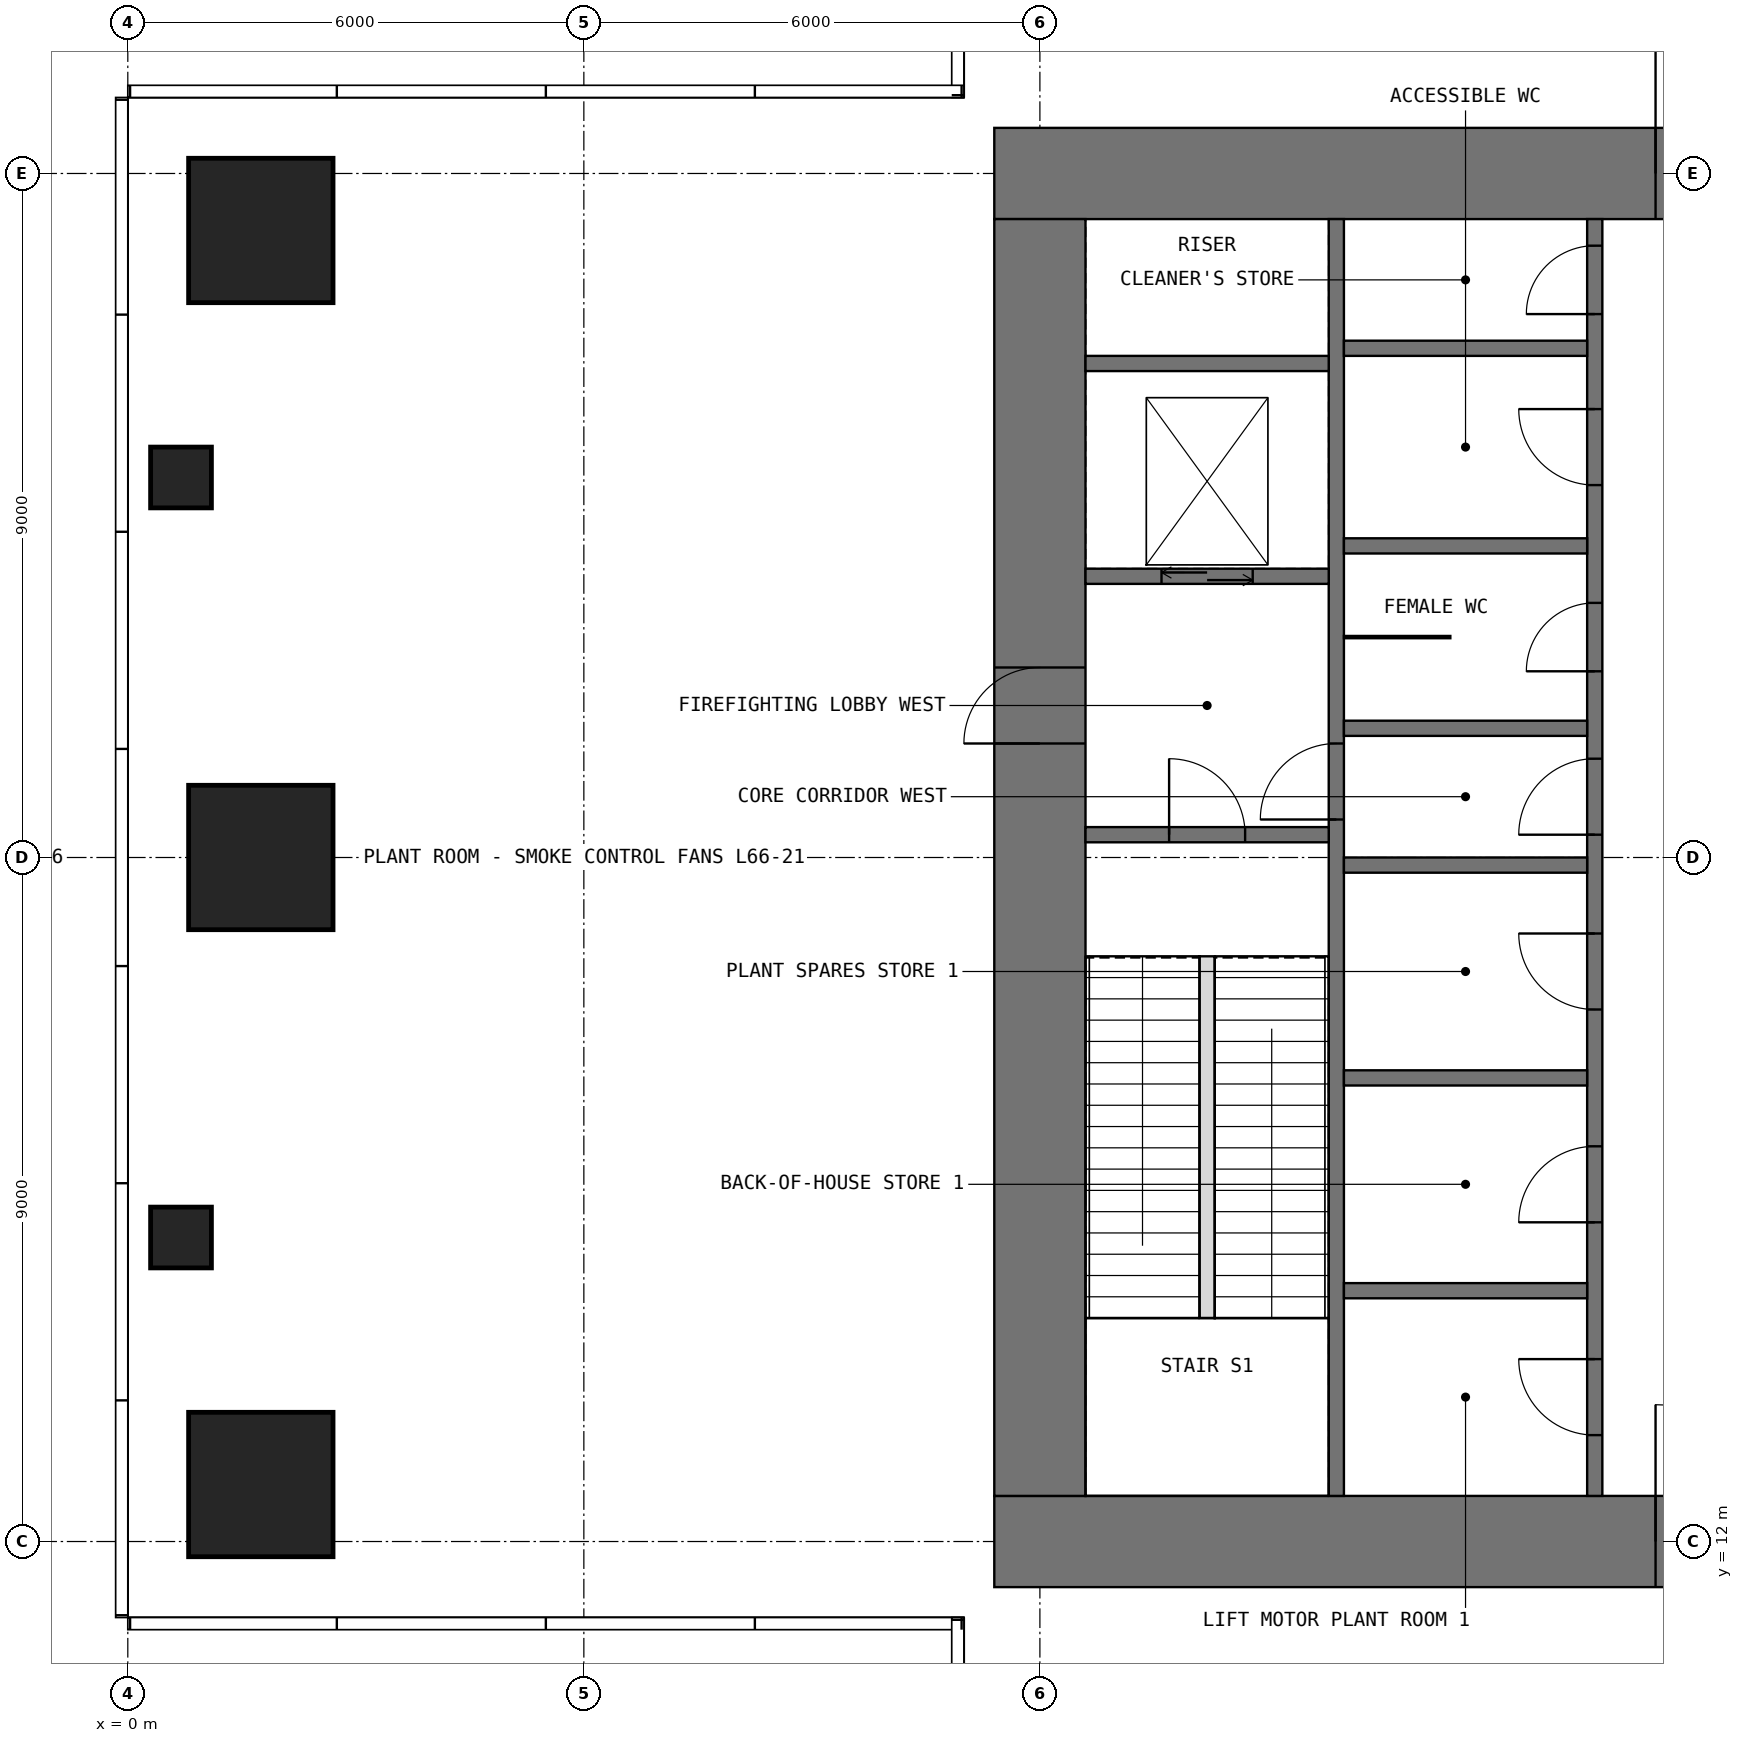
"""IFC4 building model, lengths in metres.
Left out: names, types, materials, properties, quantities, classifications, styles, units other than length and angle.
Written with IfcOpenShell. Run it as: python <this file> out.ifc"""

import sys

from ifc_helpers import new_model, si_unit, direction, frame, frame_2d, origin, origin_2d, place, context, subcontext, project, spatial, rectangle, extrude, element, fill, save


model = new_model("IFC4")
c1 = context("Model", 3, precision=1e-05, world=origin(), true_north=direction((0.0, 1.0)))
c2 = subcontext(c1, "Body", "Model", "MODEL_VIEW")
j1 = project(units=[si_unit("LENGTHUNIT", "METRE"), si_unit("PLANEANGLEUNIT", "RADIAN")], contexts=[c1])
p1 = place(None, origin())
s1 = spatial("IfcSite", under=j1, at=p1, CompositionType="ELEMENT")
p2 = place(p1, origin())
s2 = spatial("IfcBuilding", under=s1, at=p2, CompositionType="ELEMENT")
p3 = place(p2, frame((0.0, 0.0, 277.9)))
s3 = spatial("IfcBuildingStorey", under=s2, at=p3, CompositionType="ELEMENT", Elevation=277.9)
p4 = place(p3, frame((1.75, 12.75, 0.0), z_axis=(0.0, 0.0, 1.0), x_axis=(1.0, 0.0, 0.0)))
e1 = element("IfcColumn", 1, at=p4, inside=s3, PredefinedType="COLUMN", context=c2, shape_type="SweptSolid", body=[
    extrude(rectangle(XDim=1.9, YDim=1.9, at=origin_2d()), origin(), (0.0, 0.0, 1.0), 6.0),
])
p5 = place(p3, frame((0.7, 16.0, 0.0), z_axis=(0.0, 0.0, 1.0), x_axis=(1.0, 0.0, 0.0)))
e2 = element("IfcColumn", 2, at=p5, inside=s3, PredefinedType="COLUMN", context=c2, shape_type="SweptSolid", body=[
    extrude(rectangle(XDim=0.8, YDim=0.8, at=origin_2d()), origin(), (0.0, 0.0, 1.0), 6.0),
])
p6 = place(p3, frame((1.75, 21.0, 0.0), z_axis=(0.0, 0.0, 1.0), x_axis=(1.0, 0.0, 0.0)))
e3 = element("IfcColumn", 3, at=p6, inside=s3, PredefinedType="COLUMN", context=c2, shape_type="SweptSolid", body=[
    extrude(rectangle(XDim=1.9, YDim=1.9, at=origin_2d()), origin(), (0.0, 0.0, 1.0), 6.0),
])
p7 = place(p3, frame((0.7, 26.0, 0.0), z_axis=(0.0, 0.0, 1.0), x_axis=(1.0, 0.0, 0.0)))
e4 = element("IfcColumn", 4, at=p7, inside=s3, PredefinedType="COLUMN", context=c2, shape_type="SweptSolid", body=[
    extrude(rectangle(XDim=0.8, YDim=0.8, at=origin_2d()), origin(), (0.0, 0.0, 1.0), 6.0),
])
p8 = place(p3, frame((1.75, 29.25, 0.0), z_axis=(0.0, 0.0, 1.0), x_axis=(1.0, 0.0, 0.0)))
e5 = element("IfcColumn", 5, at=p8, inside=s3, PredefinedType="COLUMN", context=c2, shape_type="SweptSolid", body=[
    extrude(rectangle(XDim=1.9, YDim=1.9, at=origin_2d()), origin(), (0.0, 0.0, 1.0), 6.0),
])
p9 = place(p3, frame((11.4, 12.0, -0.1), z_axis=(0.0, 0.0, 1.0), x_axis=(1.0, 0.0, 0.0)))
e6 = element("IfcWall", 6, at=p9, inside=s3, PredefinedType="SHEAR", context=c2, shape_type="SweptSolid", body=[
    extrude(rectangle(XDim=19.2, YDim=1.2, at=frame_2d((9.6, 0.0))), origin(), (0.0, 0.0, 1.0), 6.0),
])
p10 = place(p9, frame((8.7, 0.0, 0.1)))
e7 = element("IfcOpeningElement", 7, at=p10, cuts=e6, PredefinedType="OPENING", context=c2, shape_type="SweptSolid", body=[
    extrude(rectangle(XDim=1.8, YDim=2.4, at=frame_2d((0.9, 1.2))), frame((0.0, 0.61, 0.0), z_axis=(0.0, -1.0, 0.0), x_axis=(1.0, 0.0, 0.0)), (0.0, 0.0, 1.0), 1.22),
])
p11 = place(p3, frame((11.4, 30.0, -0.1), z_axis=(0.0, 0.0, 1.0), x_axis=(1.0, 0.0, 0.0)))
e8 = element("IfcWall", 8, at=p11, inside=s3, PredefinedType="SHEAR", context=c2, shape_type="SweptSolid", body=[
    extrude(rectangle(XDim=19.2, YDim=1.2, at=frame_2d((9.6, 0.0))), origin(), (0.0, 0.0, 1.0), 6.0),
])
p12 = place(p11, frame((8.7, 0.0, 0.1)))
e9 = element("IfcOpeningElement", 9, at=p12, cuts=e8, PredefinedType="OPENING", context=c2, shape_type="SweptSolid", body=[
    extrude(rectangle(XDim=1.8, YDim=2.4, at=frame_2d((0.9, 1.2))), frame((0.0, 0.61, 0.0), z_axis=(0.0, -1.0, 0.0), x_axis=(1.0, 0.0, 0.0)), (0.0, 0.0, 1.0), 1.22),
])
p13 = place(p3, frame((12.0, 12.6, -0.1), z_axis=(0.0, 0.0, 1.0), x_axis=(0.0, 1.0, 0.0)))
e10 = element("IfcWall", 10, at=p13, inside=s3, PredefinedType="SHEAR", context=c2, shape_type="SweptSolid", body=[
    extrude(rectangle(XDim=16.8, YDim=1.2, at=frame_2d((8.4, 0.0))), origin(), (0.0, 0.0, 1.0), 6.0),
])
p14 = place(p13, frame((9.9, 0.0, 0.1)))
e11 = element("IfcOpeningElement", 11, at=p14, cuts=e10, PredefinedType="OPENING", context=c2, shape_type="SweptSolid", body=[
    extrude(rectangle(XDim=1.0, YDim=2.2, at=frame_2d((0.5, 1.1))), frame((0.0, 0.61, 0.0), z_axis=(0.0, -1.0, 0.0), x_axis=(1.0, 0.0, 0.0)), (0.0, 0.0, 1.0), 1.22),
])
p15 = place(p3, frame((15.9, 12.6, -0.1), z_axis=(0.0, 0.0, 1.0), x_axis=(0.0, 1.0, 0.0)))
e12 = element("IfcWall", 12, at=p15, inside=s3, PredefinedType="SHEAR", context=c2, shape_type="SweptSolid", body=[
    extrude(rectangle(XDim=16.8, YDim=0.2, at=frame_2d((8.4, 0.0))), origin(), (0.0, 0.0, 1.0), 6.0),
])
p16 = place(p15, frame((8.9, 0.0, 0.1)))
e13 = element("IfcOpeningElement", 13, at=p16, cuts=e12, PredefinedType="OPENING", context=c2, shape_type="SweptSolid", body=[
    extrude(rectangle(XDim=1.0, YDim=2.2, at=frame_2d((0.5, 1.1))), frame((0.0, 0.11, 0.0), z_axis=(0.0, -1.0, 0.0), x_axis=(1.0, 0.0, 0.0)), (0.0, 0.0, 1.0), 0.22),
])
p17 = place(p3, frame((19.3, 12.6, -0.1), z_axis=(0.0, 0.0, 1.0), x_axis=(0.0, 1.0, 0.0)))
e14 = element("IfcWall", 14, at=p17, inside=s3, PredefinedType="SHEAR", context=c2, shape_type="SweptSolid", body=[
    extrude(rectangle(XDim=16.8, YDim=0.2, at=frame_2d((8.4, 0.0))), origin(), (0.0, 0.0, 1.0), 6.0),
])
p18 = place(p17, frame((8.7, 0.0, 0.1)))
e15 = element("IfcOpeningElement", 15, at=p18, cuts=e14, PredefinedType="OPENING", context=c2, shape_type="SweptSolid", body=[
    extrude(rectangle(XDim=1.0, YDim=2.2, at=frame_2d((0.5, 1.1))), frame((0.0, 0.11, 0.0), z_axis=(0.0, -1.0, 0.0), x_axis=(1.0, 0.0, 0.0)), (0.0, 0.0, 1.0), 0.22),
])
p19 = place(p17, frame((10.85, 0.0, 0.1)))
e16 = element("IfcOpeningElement", 16, at=p19, cuts=e14, PredefinedType="OPENING", context=c2, shape_type="SweptSolid", body=[
    extrude(rectangle(XDim=0.9, YDim=2.2, at=frame_2d((0.45, 1.1))), frame((0.0, 0.11, 0.0), z_axis=(0.0, -1.0, 0.0), x_axis=(1.0, 0.0, 0.0)), (0.0, 0.0, 1.0), 0.22),
])
p20 = place(p17, frame((13.3, 0.0, 0.1)))
e17 = element("IfcOpeningElement", 17, at=p20, cuts=e14, PredefinedType="OPENING", context=c2, shape_type="SweptSolid", body=[
    extrude(rectangle(XDim=1.0, YDim=2.2, at=frame_2d((0.5, 1.1))), frame((0.0, 0.11, 0.0), z_axis=(0.0, -1.0, 0.0), x_axis=(1.0, 0.0, 0.0)), (0.0, 0.0, 1.0), 0.22),
])
p21 = place(p17, frame((15.55, 0.0, 0.1)))
e18 = element("IfcOpeningElement", 18, at=p21, cuts=e14, PredefinedType="OPENING", context=c2, shape_type="SweptSolid", body=[
    extrude(rectangle(XDim=0.9, YDim=2.2, at=frame_2d((0.45, 1.1))), frame((0.0, 0.11, 0.0), z_axis=(0.0, -1.0, 0.0), x_axis=(1.0, 0.0, 0.0)), (0.0, 0.0, 1.0), 0.22),
])
p22 = place(p17, frame((0.8, 0.0, 0.1)))
e19 = element("IfcOpeningElement", 19, at=p22, cuts=e14, PredefinedType="OPENING", context=c2, shape_type="SweptSolid", body=[
    extrude(rectangle(XDim=1.0, YDim=2.2, at=frame_2d((0.5, 1.1))), frame((0.0, 0.11, 0.0), z_axis=(0.0, -1.0, 0.0), x_axis=(1.0, 0.0, 0.0)), (0.0, 0.0, 1.0), 0.22),
])
p23 = place(p17, frame((3.6, 0.0, 0.1)))
e20 = element("IfcOpeningElement", 20, at=p23, cuts=e14, PredefinedType="OPENING", context=c2, shape_type="SweptSolid", body=[
    extrude(rectangle(XDim=1.0, YDim=2.2, at=frame_2d((0.5, 1.1))), frame((0.0, 0.11, 0.0), z_axis=(0.0, -1.0, 0.0), x_axis=(1.0, 0.0, 0.0)), (0.0, 0.0, 1.0), 0.22),
])
p24 = place(p17, frame((6.4, 0.0, 0.1)))
e21 = element("IfcOpeningElement", 21, at=p24, cuts=e14, PredefinedType="OPENING", context=c2, shape_type="SweptSolid", body=[
    extrude(rectangle(XDim=1.0, YDim=2.2, at=frame_2d((0.5, 1.1))), frame((0.0, 0.11, 0.0), z_axis=(0.0, -1.0, 0.0), x_axis=(1.0, 0.0, 0.0)), (0.0, 0.0, 1.0), 0.22),
])
p25 = place(p3, frame((12.6, 21.3, -0.1), z_axis=(0.0, 0.0, 1.0), x_axis=(1.0, 0.0, 0.0)))
e22 = element("IfcWall", 22, at=p25, inside=s3, PredefinedType="SHEAR", context=c2, shape_type="SweptSolid", body=[
    extrude(rectangle(XDim=3.2, YDim=0.2, at=frame_2d((1.6, 0.0))), origin(), (0.0, 0.0, 1.0), 6.0),
])
p26 = place(p25, frame((1.1, 0.0, 0.1)))
e23 = element("IfcOpeningElement", 23, at=p26, cuts=e22, PredefinedType="OPENING", context=c2, shape_type="SweptSolid", body=[
    extrude(rectangle(XDim=1.0, YDim=2.2, at=frame_2d((0.5, 1.1))), frame((0.0, 0.11, 0.0), z_axis=(0.0, -1.0, 0.0), x_axis=(1.0, 0.0, 0.0)), (0.0, 0.0, 1.0), 0.22),
])
p27 = place(p3, frame((12.6, 24.7, -0.1), z_axis=(0.0, 0.0, 1.0), x_axis=(1.0, 0.0, 0.0)))
e24 = element("IfcWall", 24, at=p27, inside=s3, PredefinedType="SHEAR", context=c2, shape_type="SweptSolid", body=[
    extrude(rectangle(XDim=3.2, YDim=0.2, at=frame_2d((1.6, 0.0))), origin(), (0.0, 0.0, 1.0), 6.0),
])
p28 = place(p27, frame((1.0, 0.0, 0.1)))
e25 = element("IfcOpeningElement", 25, at=p28, cuts=e24, PredefinedType="OPENING", context=c2, shape_type="SweptSolid", body=[
    extrude(rectangle(XDim=1.2, YDim=2.2, at=frame_2d((0.6, 1.1))), frame((0.0, 0.11, 0.0), z_axis=(0.0, -1.0, 0.0), x_axis=(1.0, 0.0, 0.0)), (0.0, 0.0, 1.0), 0.22),
])
for number, where, z_axis, x_axis in (
    (26, (12.6, 27.5, -0.1), (0.0, 0.0, 1.0), (1.0, 0.0, 0.0)),
    (27, (16.0, 15.3, -0.1), (0.0, 0.0, 1.0), (1.0, 0.0, 0.0)),
    (28, (16.0, 18.1, -0.1), (0.0, 0.0, 1.0), (1.0, 0.0, 0.0)),
    (29, (16.0, 20.9, -0.1), (0.0, 0.0, 1.0), (1.0, 0.0, 0.0)),
    (30, (16.0, 22.7, -0.1), (0.0, 0.0, 1.0), (1.0, 0.0, 0.0)),
    (31, (16.0, 25.1, -0.1), (0.0, 0.0, 1.0), (1.0, 0.0, 0.0)),
    (32, (16.0, 27.7, -0.1), (0.0, 0.0, 1.0), (1.0, 0.0, 0.0)),
):
    element("IfcWall", number, at=place(p3, frame(where, z_axis=z_axis, x_axis=x_axis)), inside=s3, PredefinedType="SHEAR", context=c2, shape_type="SweptSolid", body=[
        extrude(rectangle(XDim=3.2, YDim=0.2, at=frame_2d((1.6, 0.0))), origin(), (0.0, 0.0, 1.0), 6.0),
    ])
p29 = place(p3, frame((16.0, 23.9, 0.0), z_axis=(0.0, 0.0, 1.0), x_axis=(1.0, 0.0, 0.0)))
e33 = element("IfcWall", 33, at=p29, inside=s3, PredefinedType="PARTITIONING", context=c2, shape_type="SweptSolid", body=[
    extrude(rectangle(XDim=1.4, YDim=0.03, at=frame_2d((0.7, 0.0))), origin(), (0.0, 0.0, 1.0), 5.7),
])
p30 = place(p3, frame((14.2, 14.94, 0.0), z_axis=(0.0, 0.0, 1.0), x_axis=(0.0, 1.0, 0.0)))
e34 = element("IfcWall", 34, at=p30, inside=s3, PredefinedType="PARTITIONING", context=c2, shape_type="SweptSolid", body=[
    extrude(rectangle(XDim=4.76, YDim=0.2, at=frame_2d((2.38, 0.0))), origin(), (0.0, 0.0, 1.0), 6.0),
])
p31 = place(p10, origin())
e35 = element("IfcDoor", 35, at=p31, inside=s3, OperationType="DOUBLE_DOOR_SINGLE_SWING", PredefinedType="DOOR", context=c2, shape_type="SweptSolid", body=[
    extrude(rectangle(XDim=1.8, YDim=2.4, at=frame_2d((0.9, 1.2))), frame((0.0, -0.275, 0.0), z_axis=(0.0, -1.0, 0.0), x_axis=(1.0, 0.0, 0.0)), (0.0, 0.0, 1.0), 0.05),
])
fill(e7, e35)
p32 = place(p12, origin())
e36 = element("IfcDoor", 36, at=p32, inside=s3, OperationType="DOUBLE_DOOR_SINGLE_SWING", PredefinedType="DOOR", context=c2, shape_type="SweptSolid", body=[
    extrude(rectangle(XDim=1.8, YDim=2.4, at=frame_2d((0.9, 1.2))), frame((0.0, 0.325, 0.0), z_axis=(0.0, -1.0, 0.0), x_axis=(1.0, 0.0, 0.0)), (0.0, 0.0, 1.0), 0.05),
])
fill(e9, e36)
p33 = place(p14, origin())
e37 = element("IfcDoor", 37, at=p33, inside=s3, OperationType="SINGLE_SWING_LEFT", PredefinedType="DOOR", context=c2, shape_type="SweptSolid", body=[
    extrude(rectangle(XDim=1.0, YDim=2.2, at=frame_2d((0.5, 1.1))), frame((0.0, 0.325, 0.0), z_axis=(0.0, -1.0, 0.0), x_axis=(1.0, 0.0, 0.0)), (0.0, 0.0, 1.0), 0.05),
])
fill(e11, e37)
p34 = place(p26, origin())
e38 = element("IfcDoor", 38, at=p34, inside=s3, OperationType="SINGLE_SWING_LEFT", PredefinedType="DOOR", context=c2, shape_type="SweptSolid", body=[
    extrude(rectangle(XDim=1.0, YDim=2.2, at=frame_2d((0.5, 1.1))), frame((0.0, 0.025, 0.0), z_axis=(0.0, -1.0, 0.0), x_axis=(1.0, 0.0, 0.0)), (0.0, 0.0, 1.0), 0.05),
])
fill(e23, e38)
p35 = place(p16, origin())
e39 = element("IfcDoor", 39, at=p35, inside=s3, OperationType="SINGLE_SWING_LEFT", PredefinedType="DOOR", context=c2, shape_type="SweptSolid", body=[
    extrude(rectangle(XDim=1.0, YDim=2.2, at=frame_2d((0.5, 1.1))), frame((0.0, 0.025, 0.0), z_axis=(0.0, -1.0, 0.0), x_axis=(1.0, 0.0, 0.0)), (0.0, 0.0, 1.0), 0.05),
])
fill(e13, e39)
p36 = place(p18, origin())
e40 = element("IfcDoor", 40, at=p36, inside=s3, OperationType="SINGLE_SWING_LEFT", PredefinedType="DOOR", context=c2, shape_type="SweptSolid", body=[
    extrude(rectangle(XDim=1.0, YDim=2.2, at=frame_2d((0.5, 1.1))), frame((0.0, 0.025, 0.0), z_axis=(0.0, -1.0, 0.0), x_axis=(1.0, 0.0, 0.0)), (0.0, 0.0, 1.0), 0.05),
])
fill(e15, e40)
p37 = place(p19, origin())
e41 = element("IfcDoor", 41, at=p37, inside=s3, OperationType="SINGLE_SWING_LEFT", PredefinedType="DOOR", context=c2, shape_type="SweptSolid", body=[
    extrude(rectangle(XDim=0.9, YDim=2.2, at=frame_2d((0.45, 1.1))), frame((0.0, 0.025, 0.0), z_axis=(0.0, -1.0, 0.0), x_axis=(1.0, 0.0, 0.0)), (0.0, 0.0, 1.0), 0.05),
])
fill(e16, e41)
p38 = place(p20, origin())
e42 = element("IfcDoor", 42, at=p38, inside=s3, OperationType="SINGLE_SWING_RIGHT", PredefinedType="DOOR", context=c2, shape_type="SweptSolid", body=[
    extrude(rectangle(XDim=1.0, YDim=2.2, at=frame_2d((0.5, 1.1))), frame((0.0, 0.025, 0.0), z_axis=(0.0, -1.0, 0.0), x_axis=(1.0, 0.0, 0.0)), (0.0, 0.0, 1.0), 0.05),
])
fill(e17, e42)
p39 = place(p21, origin())
e43 = element("IfcDoor", 43, at=p39, inside=s3, OperationType="SINGLE_SWING_LEFT", PredefinedType="DOOR", context=c2, shape_type="SweptSolid", body=[
    extrude(rectangle(XDim=0.9, YDim=2.2, at=frame_2d((0.45, 1.1))), frame((0.0, 0.025, 0.0), z_axis=(0.0, -1.0, 0.0), x_axis=(1.0, 0.0, 0.0)), (0.0, 0.0, 1.0), 0.05),
])
fill(e18, e43)
p40 = place(p22, origin())
e44 = element("IfcDoor", 44, at=p40, inside=s3, OperationType="SINGLE_SWING_RIGHT", PredefinedType="DOOR", context=c2, shape_type="SweptSolid", body=[
    extrude(rectangle(XDim=1.0, YDim=2.2, at=frame_2d((0.5, 1.1))), frame((0.0, 0.025, 0.0), z_axis=(0.0, -1.0, 0.0), x_axis=(1.0, 0.0, 0.0)), (0.0, 0.0, 1.0), 0.05),
])
fill(e19, e44)
p41 = place(p23, origin())
e45 = element("IfcDoor", 45, at=p41, inside=s3, OperationType="SINGLE_SWING_LEFT", PredefinedType="DOOR", context=c2, shape_type="SweptSolid", body=[
    extrude(rectangle(XDim=1.0, YDim=2.2, at=frame_2d((0.5, 1.1))), frame((0.0, 0.025, 0.0), z_axis=(0.0, -1.0, 0.0), x_axis=(1.0, 0.0, 0.0)), (0.0, 0.0, 1.0), 0.05),
])
fill(e20, e45)
p42 = place(p24, origin())
e46 = element("IfcDoor", 46, at=p42, inside=s3, OperationType="SINGLE_SWING_RIGHT", PredefinedType="DOOR", context=c2, shape_type="SweptSolid", body=[
    extrude(rectangle(XDim=1.0, YDim=2.2, at=frame_2d((0.5, 1.1))), frame((0.0, 0.025, 0.0), z_axis=(0.0, -1.0, 0.0), x_axis=(1.0, 0.0, 0.0)), (0.0, 0.0, 1.0), 0.05),
])
fill(e21, e46)
p43 = place(p28, origin())
e47 = element("IfcDoor", 47, at=p43, inside=s3, OperationType="DOUBLE_DOOR_SLIDING", PredefinedType="DOOR", context=c2, shape_type="SweptSolid", body=[
    extrude(rectangle(XDim=1.2, YDim=2.2, at=frame_2d((0.6, 1.1))), frame((0.0, 0.025, 0.0), z_axis=(0.0, -1.0, 0.0), x_axis=(1.0, 0.0, 0.0)), (0.0, 0.0, 1.0), 0.05),
])
fill(e25, e47)
save(model, sys.argv[1])
